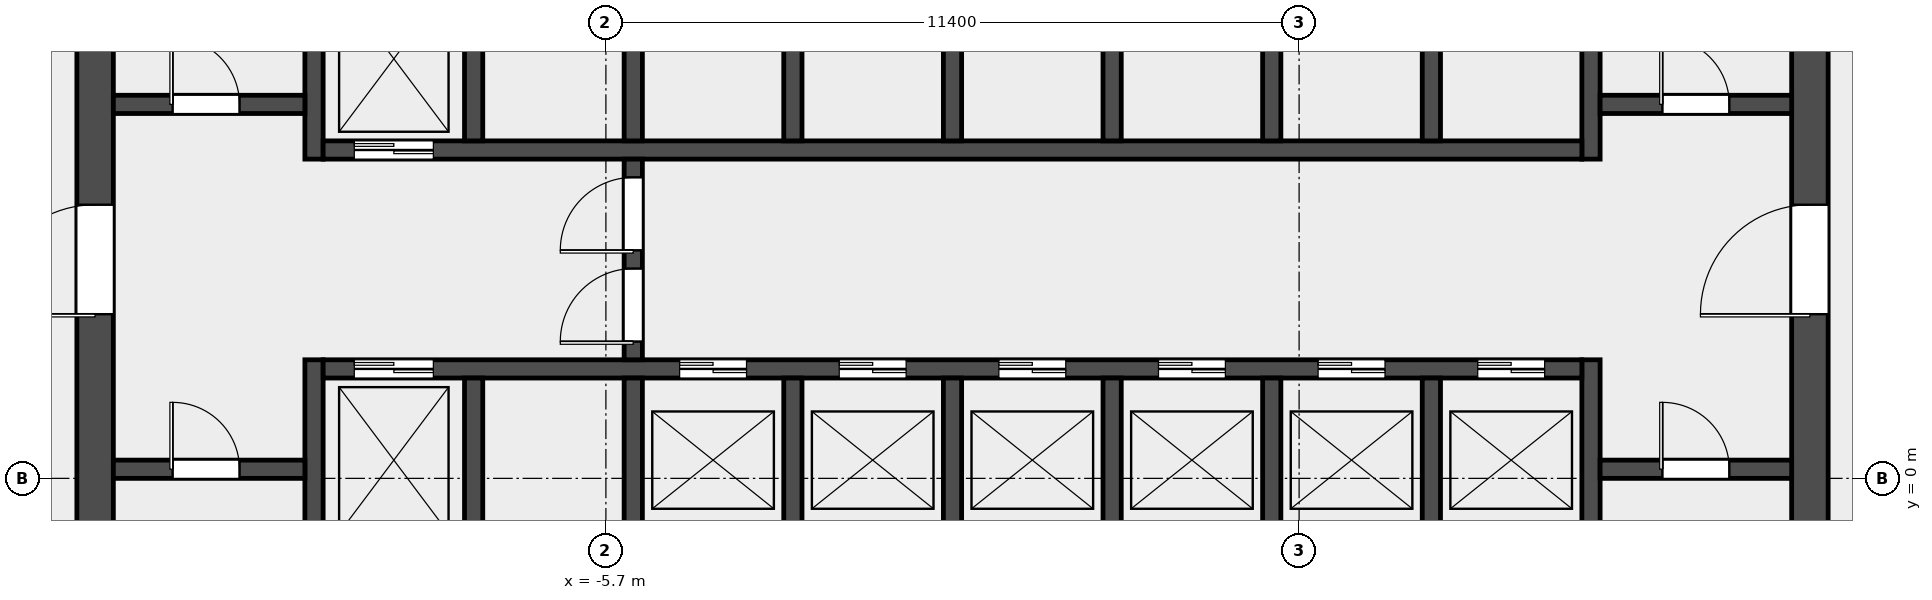
"""IFC4 building model, lengths in metres.
Left out: names, types, materials, properties, quantities, classifications, styles, units other than length and angle.
Written with IfcOpenShell. Run it as: python <this file> out.ifc"""

import sys

from ifc_helpers import new_model, si_unit, direction, frame, frame_2d, origin, place, context, subcontext, project, spatial, rectangle, extrude, element, fill, save


model = new_model("IFC4")
c1 = context("Model", 3, precision=1e-05, world=origin(), true_north=direction((0.0, 1.0)))
c2 = subcontext(c1, "Body", "Model", "MODEL_VIEW")
j1 = project(units=[si_unit("LENGTHUNIT", "METRE"), si_unit("PLANEANGLEUNIT", "RADIAN")], contexts=[c1])
p1 = place(None, origin())
s1 = spatial("IfcSite", under=j1, at=p1, CompositionType="ELEMENT")
p2 = place(p1, origin())
s2 = spatial("IfcBuilding", under=s1, at=p2, CompositionType="ELEMENT")
p3 = place(p2, frame((0.0, 0.0, 31.0)))
s3 = spatial("IfcBuildingStorey", under=s2, at=p3, CompositionType="ELEMENT", Elevation=31.0)
p4 = place(p3, frame((-14.1, -6.6, 0.0), z_axis=(0.0, 0.0, 1.0), x_axis=(0.0, 1.0, 0.0)))
e1 = element("IfcWall", 1, at=p4, inside=s3, PredefinedType="SHEAR", context=c2, shape_type="SweptSolid", body=[
    extrude(rectangle(XDim=19.5, YDim=0.6, at=frame_2d((9.75, 0.0))), origin(), (0.0, 0.0, 1.0), 4.5),
])
p5 = place(p4, frame((9.3, 0.0, 0.0)))
e2 = element("IfcOpeningElement", 2, at=p5, cuts=e1, PredefinedType="OPENING", context=c2, shape_type="SweptSolid", body=[
    extrude(rectangle(XDim=1.8, YDim=2.1, at=frame_2d((0.9, 1.05))), frame((0.0, 0.312, 0.0), z_axis=(0.0, -1.0, 0.0), x_axis=(1.0, 0.0, 0.0)), (0.0, 0.0, 1.0), 0.624),
])
p6 = place(p3, frame((14.1, -6.6, 0.0), z_axis=(0.0, 0.0, 1.0), x_axis=(0.0, 1.0, 0.0)))
e3 = element("IfcWall", 3, at=p6, inside=s3, PredefinedType="SHEAR", context=c2, shape_type="SweptSolid", body=[
    extrude(rectangle(XDim=19.5, YDim=0.6, at=frame_2d((9.75, 0.0))), origin(), (0.0, 0.0, 1.0), 4.5),
])
p7 = place(p6, frame((9.3, 0.0, 0.0)))
e4 = element("IfcOpeningElement", 4, at=p7, cuts=e3, PredefinedType="OPENING", context=c2, shape_type="SweptSolid", body=[
    extrude(rectangle(XDim=1.8, YDim=2.1, at=frame_2d((0.9, 1.05))), frame((0.0, 0.312, 0.0), z_axis=(0.0, -1.0, 0.0), x_axis=(1.0, 0.0, 0.0)), (0.0, 0.0, 1.0), 0.624),
])
p8 = place(p3, frame((-10.5, -6.6, 0.0), z_axis=(0.0, 0.0, 1.0), x_axis=(0.0, 1.0, 0.0)))
e5 = element("IfcWall", 5, at=p8, inside=s3, PredefinedType="SHEAR", context=c2, shape_type="SweptSolid", body=[
    extrude(rectangle(XDim=8.55, YDim=0.3, at=frame_2d((4.275, 0.0))), origin(), (0.0, 0.0, 1.0), 4.5),
])
p9 = place(p3, frame((-10.5, 5.25, 0.0), z_axis=(0.0, 0.0, 1.0), x_axis=(0.0, 1.0, 0.0)))
e6 = element("IfcWall", 6, at=p9, inside=s3, PredefinedType="SHEAR", context=c2, shape_type="SweptSolid", body=[
    extrude(rectangle(XDim=7.65, YDim=0.3, at=frame_2d((3.825, 0.0))), origin(), (0.0, 0.0, 1.0), 4.5),
])
p10 = place(p3, frame((10.5, -6.6, 0.0), z_axis=(0.0, 0.0, 1.0), x_axis=(0.0, 1.0, 0.0)))
e7 = element("IfcWall", 7, at=p10, inside=s3, PredefinedType="SHEAR", context=c2, shape_type="SweptSolid", body=[
    extrude(rectangle(XDim=8.55, YDim=0.3, at=frame_2d((4.275, 0.0))), origin(), (0.0, 0.0, 1.0), 4.5),
])
p11 = place(p3, frame((10.5, 5.25, 0.0), z_axis=(0.0, 0.0, 1.0), x_axis=(0.0, 1.0, 0.0)))
e8 = element("IfcWall", 8, at=p11, inside=s3, PredefinedType="SHEAR", context=c2, shape_type="SweptSolid", body=[
    extrude(rectangle(XDim=7.65, YDim=0.3, at=frame_2d((3.825, 0.0))), origin(), (0.0, 0.0, 1.0), 4.5),
])
p12 = place(p3, frame((-13.8, 0.15, 0.0), z_axis=(0.0, 0.0, 1.0), x_axis=(1.0, 0.0, 0.0)))
e9 = element("IfcWall", 9, at=p12, inside=s3, PredefinedType="SOLIDWALL", context=c2, shape_type="SweptSolid", body=[
    extrude(rectangle(XDim=3.15, YDim=0.3, at=frame_2d((1.575, 0.0))), origin(), (0.0, 0.0, 1.0), 4.5),
])
p13 = place(p12, frame((0.975, 0.0, 0.0)))
e10 = element("IfcOpeningElement", 10, at=p13, cuts=e9, PredefinedType="OPENING", context=c2, shape_type="SweptSolid", body=[
    extrude(rectangle(XDim=1.1, YDim=2.1, at=frame_2d((0.55, 1.05))), frame((0.0, 0.162, 0.0), z_axis=(0.0, -1.0, 0.0), x_axis=(1.0, 0.0, 0.0)), (0.0, 0.0, 1.0), 0.324),
])
p14 = place(p3, frame((-13.8, 6.15, 0.0), z_axis=(0.0, 0.0, 1.0), x_axis=(1.0, 0.0, 0.0)))
e11 = element("IfcWall", 11, at=p14, inside=s3, PredefinedType="SOLIDWALL", context=c2, shape_type="SweptSolid", body=[
    extrude(rectangle(XDim=3.15, YDim=0.3, at=frame_2d((1.575, 0.0))), origin(), (0.0, 0.0, 1.0), 4.5),
])
p15 = place(p14, frame((0.975, 0.0, 0.0)))
e12 = element("IfcOpeningElement", 12, at=p15, cuts=e11, PredefinedType="OPENING", context=c2, shape_type="SweptSolid", body=[
    extrude(rectangle(XDim=1.1, YDim=2.1, at=frame_2d((0.55, 1.05))), frame((0.0, 0.162, 0.0), z_axis=(0.0, -1.0, 0.0), x_axis=(1.0, 0.0, 0.0)), (0.0, 0.0, 1.0), 0.324),
])
p16 = place(p3, frame((10.65, 0.15, 0.0), z_axis=(0.0, 0.0, 1.0), x_axis=(1.0, 0.0, 0.0)))
e13 = element("IfcWall", 13, at=p16, inside=s3, PredefinedType="SOLIDWALL", context=c2, shape_type="SweptSolid", body=[
    extrude(rectangle(XDim=3.15, YDim=0.3, at=frame_2d((1.575, 0.0))), origin(), (0.0, 0.0, 1.0), 4.5),
])
p17 = place(p16, frame((1.025, 0.0, 0.0)))
e14 = element("IfcOpeningElement", 14, at=p17, cuts=e13, PredefinedType="OPENING", context=c2, shape_type="SweptSolid", body=[
    extrude(rectangle(XDim=1.1, YDim=2.1, at=frame_2d((0.55, 1.05))), frame((0.0, 0.162, 0.0), z_axis=(0.0, -1.0, 0.0), x_axis=(1.0, 0.0, 0.0)), (0.0, 0.0, 1.0), 0.324),
])
p18 = place(p3, frame((10.65, 6.15, 0.0), z_axis=(0.0, 0.0, 1.0), x_axis=(1.0, 0.0, 0.0)))
e15 = element("IfcWall", 15, at=p18, inside=s3, PredefinedType="SOLIDWALL", context=c2, shape_type="SweptSolid", body=[
    extrude(rectangle(XDim=3.15, YDim=0.3, at=frame_2d((1.575, 0.0))), origin(), (0.0, 0.0, 1.0), 4.5),
])
p19 = place(p18, frame((1.025, 0.0, 0.0)))
e16 = element("IfcOpeningElement", 16, at=p19, cuts=e15, PredefinedType="OPENING", context=c2, shape_type="SweptSolid", body=[
    extrude(rectangle(XDim=1.1, YDim=2.1, at=frame_2d((0.55, 1.05))), frame((0.0, 0.162, 0.0), z_axis=(0.0, -1.0, 0.0), x_axis=(1.0, 0.0, 0.0)), (0.0, 0.0, 1.0), 0.324),
])
p20 = place(p3, frame((-10.35, 1.8, 0.0), z_axis=(0.0, 0.0, 1.0), x_axis=(1.0, 0.0, 0.0)))
e17 = element("IfcWall", 17, at=p20, inside=s3, PredefinedType="SOLIDWALL", context=c2, shape_type="SweptSolid", body=[
    extrude(rectangle(XDim=20.7, YDim=0.3, at=frame_2d((10.35, 0.0))), origin(), (0.0, 0.0, 1.0), 4.5),
])
p21 = place(p20, frame((0.512, 0.0, 0.0)))
e18 = element("IfcOpeningElement", 18, at=p21, cuts=e17, PredefinedType="OPENING", context=c2, shape_type="SweptSolid", body=[
    extrude(rectangle(XDim=1.3, YDim=2.1, at=frame_2d((0.65, 1.05))), frame((0.0, 0.162, 0.0), z_axis=(0.0, -1.0, 0.0), x_axis=(1.0, 0.0, 0.0)), (0.0, 0.0, 1.0), 0.324),
])
p22 = place(p20, frame((5.863, 0.0, 0.0)))
e19 = element("IfcOpeningElement", 19, at=p22, cuts=e17, PredefinedType="OPENING", context=c2, shape_type="SweptSolid", body=[
    extrude(rectangle(XDim=1.1, YDim=2.1, at=frame_2d((0.55, 1.05))), frame((0.0, 0.162, 0.0), z_axis=(0.0, -1.0, 0.0), x_axis=(1.0, 0.0, 0.0)), (0.0, 0.0, 1.0), 0.324),
])
p23 = place(p20, frame((8.488, 0.0, 0.0)))
e20 = element("IfcOpeningElement", 20, at=p23, cuts=e17, PredefinedType="OPENING", context=c2, shape_type="SweptSolid", body=[
    extrude(rectangle(XDim=1.1, YDim=2.1, at=frame_2d((0.55, 1.05))), frame((0.0, 0.162, 0.0), z_axis=(0.0, -1.0, 0.0), x_axis=(1.0, 0.0, 0.0)), (0.0, 0.0, 1.0), 0.324),
])
p24 = place(p20, frame((11.113, 0.0, 0.0)))
e21 = element("IfcOpeningElement", 21, at=p24, cuts=e17, PredefinedType="OPENING", context=c2, shape_type="SweptSolid", body=[
    extrude(rectangle(XDim=1.1, YDim=2.1, at=frame_2d((0.55, 1.05))), frame((0.0, 0.162, 0.0), z_axis=(0.0, -1.0, 0.0), x_axis=(1.0, 0.0, 0.0)), (0.0, 0.0, 1.0), 0.324),
])
p25 = place(p20, frame((13.738, 0.0, 0.0)))
e22 = element("IfcOpeningElement", 22, at=p25, cuts=e17, PredefinedType="OPENING", context=c2, shape_type="SweptSolid", body=[
    extrude(rectangle(XDim=1.1, YDim=2.1, at=frame_2d((0.55, 1.05))), frame((0.0, 0.162, 0.0), z_axis=(0.0, -1.0, 0.0), x_axis=(1.0, 0.0, 0.0)), (0.0, 0.0, 1.0), 0.324),
])
p26 = place(p20, frame((16.363, 0.0, 0.0)))
e23 = element("IfcOpeningElement", 23, at=p26, cuts=e17, PredefinedType="OPENING", context=c2, shape_type="SweptSolid", body=[
    extrude(rectangle(XDim=1.1, YDim=2.1, at=frame_2d((0.55, 1.05))), frame((0.0, 0.162, 0.0), z_axis=(0.0, -1.0, 0.0), x_axis=(1.0, 0.0, 0.0)), (0.0, 0.0, 1.0), 0.324),
])
p27 = place(p20, frame((18.988, 0.0, 0.0)))
e24 = element("IfcOpeningElement", 24, at=p27, cuts=e17, PredefinedType="OPENING", context=c2, shape_type="SweptSolid", body=[
    extrude(rectangle(XDim=1.1, YDim=2.1, at=frame_2d((0.55, 1.05))), frame((0.0, 0.162, 0.0), z_axis=(0.0, -1.0, 0.0), x_axis=(1.0, 0.0, 0.0)), (0.0, 0.0, 1.0), 0.324),
])
p28 = place(p3, frame((-10.35, 5.4, 0.0), z_axis=(0.0, 0.0, 1.0), x_axis=(1.0, 0.0, 0.0)))
e25 = element("IfcWall", 25, at=p28, inside=s3, PredefinedType="SOLIDWALL", context=c2, shape_type="SweptSolid", body=[
    extrude(rectangle(XDim=20.7, YDim=0.3, at=frame_2d((10.35, 0.0))), origin(), (0.0, 0.0, 1.0), 4.5),
])
p29 = place(p28, frame((0.512, 0.0, 0.0)))
e26 = element("IfcOpeningElement", 26, at=p29, cuts=e25, PredefinedType="OPENING", context=c2, shape_type="SweptSolid", body=[
    extrude(rectangle(XDim=1.3, YDim=2.1, at=frame_2d((0.65, 1.05))), frame((0.0, 0.162, 0.0), z_axis=(0.0, -1.0, 0.0), x_axis=(1.0, 0.0, 0.0)), (0.0, 0.0, 1.0), 0.324),
])
for number, where, z_axis, x_axis in (
    (27, (-7.875, -1.05, 0.0), (0.0, 0.0, 1.0), (0.0, 1.0, 0.0)),
    (28, (-5.25, -1.05, 0.0), (0.0, 0.0, 1.0), (0.0, 1.0, 0.0)),
    (29, (-2.625, -1.05, 0.0), (0.0, 0.0, 1.0), (0.0, 1.0, 0.0)),
    (30, (0.0, -1.05, 0.0), (0.0, 0.0, 1.0), (0.0, 1.0, 0.0)),
    (31, (2.625, -1.05, 0.0), (0.0, 0.0, 1.0), (0.0, 1.0, 0.0)),
    (32, (5.25, -1.05, 0.0), (0.0, 0.0, 1.0), (0.0, 1.0, 0.0)),
    (33, (7.875, -1.05, 0.0), (0.0, 0.0, 1.0), (0.0, 1.0, 0.0)),
    (34, (-7.875, 5.55, 0.0), (0.0, 0.0, 1.0), (0.0, 1.0, 0.0)),
    (35, (-5.25, 5.55, 0.0), (0.0, 0.0, 1.0), (0.0, 1.0, 0.0)),
    (36, (-2.625, 5.55, 0.0), (0.0, 0.0, 1.0), (0.0, 1.0, 0.0)),
    (37, (0.0, 5.55, 0.0), (0.0, 0.0, 1.0), (0.0, 1.0, 0.0)),
    (38, (2.625, 5.55, 0.0), (0.0, 0.0, 1.0), (0.0, 1.0, 0.0)),
    (39, (5.25, 5.55, 0.0), (0.0, 0.0, 1.0), (0.0, 1.0, 0.0)),
    (40, (7.875, 5.55, 0.0), (0.0, 0.0, 1.0), (0.0, 1.0, 0.0)),
):
    element("IfcWall", number, at=place(p3, frame(where, z_axis=z_axis, x_axis=x_axis)), inside=s3, PredefinedType="SOLIDWALL", context=c2, shape_type="SweptSolid", body=[
        extrude(rectangle(XDim=2.7, YDim=0.3, at=frame_2d((1.35, 0.0))), origin(), (0.0, 0.0, 1.0), 4.5),
    ])
p30 = place(p3, frame((-5.25, 1.95, 0.0), z_axis=(0.0, 0.0, 1.0), x_axis=(0.0, 1.0, 0.0)))
e41 = element("IfcWall", 41, at=p30, inside=s3, PredefinedType="SOLIDWALL", context=c2, shape_type="SweptSolid", body=[
    extrude(rectangle(XDim=3.3, YDim=0.3, at=frame_2d((1.65, 0.0))), origin(), (0.0, 0.0, 1.0), 4.5),
])
p31 = place(p30, frame((0.3, 0.0, 0.0)))
e42 = element("IfcOpeningElement", 42, at=p31, cuts=e41, PredefinedType="OPENING", context=c2, shape_type="SweptSolid", body=[
    extrude(rectangle(XDim=1.2, YDim=2.1, at=frame_2d((0.6, 1.05))), frame((0.0, 0.162, 0.0), z_axis=(0.0, -1.0, 0.0), x_axis=(1.0, 0.0, 0.0)), (0.0, 0.0, 1.0), 0.324),
])
p32 = place(p30, frame((1.8, 0.0, 0.0)))
e43 = element("IfcOpeningElement", 43, at=p32, cuts=e41, PredefinedType="OPENING", context=c2, shape_type="SweptSolid", body=[
    extrude(rectangle(XDim=1.2, YDim=2.1, at=frame_2d((0.6, 1.05))), frame((0.0, 0.162, 0.0), z_axis=(0.0, -1.0, 0.0), x_axis=(1.0, 0.0, 0.0)), (0.0, 0.0, 1.0), 0.324),
])
p33 = place(p13, origin())
e44 = element("IfcDoor", 44, at=p33, inside=s3, OperationType="SINGLE_SWING_LEFT", PredefinedType="DOOR", context=c2, shape_type="SweptSolid", body=[
    extrude(rectangle(XDim=1.1, YDim=2.1, at=frame_2d((0.55, 1.05))), frame((0.0, 0.025, 0.0), z_axis=(0.0, -1.0, 0.0), x_axis=(1.0, 0.0, 0.0)), (0.0, 0.0, 1.0), 0.05),
])
fill(e10, e44)
p34 = place(p15, origin())
e45 = element("IfcDoor", 45, at=p34, inside=s3, OperationType="SINGLE_SWING_LEFT", PredefinedType="DOOR", context=c2, shape_type="SweptSolid", body=[
    extrude(rectangle(XDim=1.1, YDim=2.1, at=frame_2d((0.55, 1.05))), frame((0.0, 0.025, 0.0), z_axis=(0.0, -1.0, 0.0), x_axis=(1.0, 0.0, 0.0)), (0.0, 0.0, 1.0), 0.05),
])
fill(e12, e45)
p35 = place(p17, origin())
e46 = element("IfcDoor", 46, at=p35, inside=s3, OperationType="SINGLE_SWING_RIGHT", PredefinedType="DOOR", context=c2, shape_type="SweptSolid", body=[
    extrude(rectangle(XDim=1.1, YDim=2.1, at=frame_2d((0.55, 1.05))), frame((0.0, 0.025, 0.0), z_axis=(0.0, -1.0, 0.0), x_axis=(1.0, 0.0, 0.0)), (0.0, 0.0, 1.0), 0.05),
])
fill(e14, e46)
p36 = place(p19, origin())
e47 = element("IfcDoor", 47, at=p36, inside=s3, OperationType="SINGLE_SWING_RIGHT", PredefinedType="DOOR", context=c2, shape_type="SweptSolid", body=[
    extrude(rectangle(XDim=1.1, YDim=2.1, at=frame_2d((0.55, 1.05))), frame((0.0, 0.025, 0.0), z_axis=(0.0, -1.0, 0.0), x_axis=(1.0, 0.0, 0.0)), (0.0, 0.0, 1.0), 0.05),
])
fill(e16, e47)
p37 = place(p5, origin())
e48 = element("IfcDoor", 48, at=p37, inside=s3, OperationType="DOUBLE_DOOR_SINGLE_SWING", PredefinedType="DOOR", context=c2, shape_type="SweptSolid", body=[
    extrude(rectangle(XDim=1.8, YDim=2.1, at=frame_2d((0.9, 1.05))), frame((0.0, 0.025, 0.0), z_axis=(0.0, -1.0, 0.0), x_axis=(1.0, 0.0, 0.0)), (0.0, 0.0, 1.0), 0.05),
])
fill(e2, e48)
p38 = place(p7, origin())
e49 = element("IfcDoor", 49, at=p38, inside=s3, OperationType="DOUBLE_DOOR_SINGLE_SWING", PredefinedType="DOOR", context=c2, shape_type="SweptSolid", body=[
    extrude(rectangle(XDim=1.8, YDim=2.1, at=frame_2d((0.9, 1.05))), frame((0.0, 0.025, 0.0), z_axis=(0.0, -1.0, 0.0), x_axis=(1.0, 0.0, 0.0)), (0.0, 0.0, 1.0), 0.05),
])
fill(e4, e49)
p39 = place(p31, origin())
e50 = element("IfcDoor", 50, at=p39, inside=s3, OperationType="SINGLE_SWING_LEFT", PredefinedType="DOOR", context=c2, shape_type="SweptSolid", body=[
    extrude(rectangle(XDim=1.2, YDim=2.1, at=frame_2d((0.6, 1.05))), frame((0.0, 0.025, 0.0), z_axis=(0.0, -1.0, 0.0), x_axis=(1.0, 0.0, 0.0)), (0.0, 0.0, 1.0), 0.05),
])
fill(e42, e50)
p40 = place(p32, origin())
e51 = element("IfcDoor", 51, at=p40, inside=s3, OperationType="SINGLE_SWING_RIGHT", PredefinedType="DOOR", context=c2, shape_type="SweptSolid", body=[
    extrude(rectangle(XDim=1.2, YDim=2.1, at=frame_2d((0.6, 1.05))), frame((0.0, 0.025, 0.0), z_axis=(0.0, -1.0, 0.0), x_axis=(1.0, 0.0, 0.0)), (0.0, 0.0, 1.0), 0.05),
])
fill(e43, e51)
p41 = place(p21, origin())
e52 = element("IfcDoor", 52, at=p41, inside=s3, OperationType="DOUBLE_DOOR_SLIDING", PredefinedType="DOOR", context=c2, shape_type="SweptSolid", body=[
    extrude(rectangle(XDim=1.3, YDim=2.1, at=frame_2d((0.65, 1.05))), frame((0.0, 0.025, 0.0), z_axis=(0.0, -1.0, 0.0), x_axis=(1.0, 0.0, 0.0)), (0.0, 0.0, 1.0), 0.05),
])
fill(e18, e52)
p42 = place(p22, origin())
e53 = element("IfcDoor", 53, at=p42, inside=s3, OperationType="DOUBLE_DOOR_SLIDING", PredefinedType="DOOR", context=c2, shape_type="SweptSolid", body=[
    extrude(rectangle(XDim=1.1, YDim=2.1, at=frame_2d((0.55, 1.05))), frame((0.0, 0.025, 0.0), z_axis=(0.0, -1.0, 0.0), x_axis=(1.0, 0.0, 0.0)), (0.0, 0.0, 1.0), 0.05),
])
fill(e19, e53)
p43 = place(p23, origin())
e54 = element("IfcDoor", 54, at=p43, inside=s3, OperationType="DOUBLE_DOOR_SLIDING", PredefinedType="DOOR", context=c2, shape_type="SweptSolid", body=[
    extrude(rectangle(XDim=1.1, YDim=2.1, at=frame_2d((0.55, 1.05))), frame((0.0, 0.025, 0.0), z_axis=(0.0, -1.0, 0.0), x_axis=(1.0, 0.0, 0.0)), (0.0, 0.0, 1.0), 0.05),
])
fill(e20, e54)
p44 = place(p24, origin())
e55 = element("IfcDoor", 55, at=p44, inside=s3, OperationType="DOUBLE_DOOR_SLIDING", PredefinedType="DOOR", context=c2, shape_type="SweptSolid", body=[
    extrude(rectangle(XDim=1.1, YDim=2.1, at=frame_2d((0.55, 1.05))), frame((0.0, 0.025, 0.0), z_axis=(0.0, -1.0, 0.0), x_axis=(1.0, 0.0, 0.0)), (0.0, 0.0, 1.0), 0.05),
])
fill(e21, e55)
p45 = place(p25, origin())
e56 = element("IfcDoor", 56, at=p45, inside=s3, OperationType="DOUBLE_DOOR_SLIDING", PredefinedType="DOOR", context=c2, shape_type="SweptSolid", body=[
    extrude(rectangle(XDim=1.1, YDim=2.1, at=frame_2d((0.55, 1.05))), frame((0.0, 0.025, 0.0), z_axis=(0.0, -1.0, 0.0), x_axis=(1.0, 0.0, 0.0)), (0.0, 0.0, 1.0), 0.05),
])
fill(e22, e56)
p46 = place(p26, origin())
e57 = element("IfcDoor", 57, at=p46, inside=s3, OperationType="DOUBLE_DOOR_SLIDING", PredefinedType="DOOR", context=c2, shape_type="SweptSolid", body=[
    extrude(rectangle(XDim=1.1, YDim=2.1, at=frame_2d((0.55, 1.05))), frame((0.0, 0.025, 0.0), z_axis=(0.0, -1.0, 0.0), x_axis=(1.0, 0.0, 0.0)), (0.0, 0.0, 1.0), 0.05),
])
fill(e23, e57)
p47 = place(p27, origin())
e58 = element("IfcDoor", 58, at=p47, inside=s3, OperationType="DOUBLE_DOOR_SLIDING", PredefinedType="DOOR", context=c2, shape_type="SweptSolid", body=[
    extrude(rectangle(XDim=1.1, YDim=2.1, at=frame_2d((0.55, 1.05))), frame((0.0, 0.025, 0.0), z_axis=(0.0, -1.0, 0.0), x_axis=(1.0, 0.0, 0.0)), (0.0, 0.0, 1.0), 0.05),
])
fill(e24, e58)
p48 = place(p29, origin())
e59 = element("IfcDoor", 59, at=p48, inside=s3, OperationType="DOUBLE_DOOR_SLIDING", PredefinedType="DOOR", context=c2, shape_type="SweptSolid", body=[
    extrude(rectangle(XDim=1.3, YDim=2.1, at=frame_2d((0.65, 1.05))), frame((0.0, 0.025, 0.0), z_axis=(0.0, -1.0, 0.0), x_axis=(1.0, 0.0, 0.0)), (0.0, 0.0, 1.0), 0.05),
])
fill(e26, e59)
save(model, sys.argv[1])
